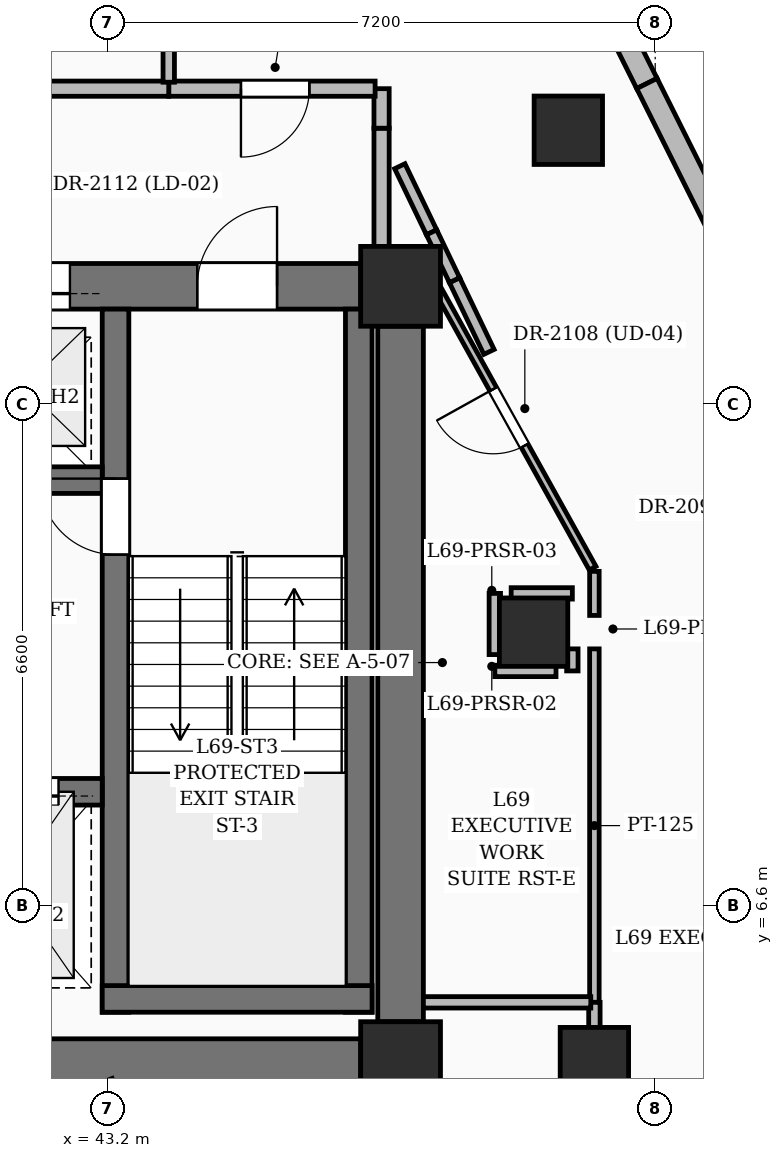
"""IFC4 building model, lengths in metres.
Left out: names, types, materials, properties, quantities, classifications, styles, units other than length and angle.
Written with IfcOpenShell. Run it as: python <this file> out.ifc"""

import sys

from ifc_helpers import new_model, si_unit, direction, frame, frame_2d, origin, origin_2d, place, context, subcontext, project, spatial, rectangle, extrude, element, fill, save


model = new_model("IFC4")
c1 = context("Model", 3, precision=1e-05, world=origin(), true_north=direction((0.0, 1.0)))
c2 = subcontext(c1, "Body", "Model", "MODEL_VIEW")
j1 = project(units=[si_unit("LENGTHUNIT", "METRE"), si_unit("PLANEANGLEUNIT", "RADIAN")], contexts=[c1])
p1 = place(None, origin())
s1 = spatial("IfcSite", under=j1, at=p1, CompositionType="ELEMENT")
p2 = place(p1, origin())
s2 = spatial("IfcBuilding", under=s1, at=p2, CompositionType="ELEMENT")
p3 = place(p2, frame((0.0, 0.0, 267.0)))
s3 = spatial("IfcBuildingStorey", under=s2, at=p3, CompositionType="ELEMENT", Elevation=267.0)
for number, where, z_axis, x_axis in (
    (1, (47.05, 4.55, 0.0), (0.0, 0.0, 1.0), (1.0, 0.0, 0.0)),
    (2, (47.05, 14.75, 0.0), (0.0, 0.0, 1.0), (1.0, 0.0, 0.0)),
):
    element("IfcColumn", number, at=place(p3, frame(where, z_axis=z_axis, x_axis=x_axis)), inside=s3, PredefinedType="COLUMN", context=c2, shape_type="SweptSolid", body=[
        extrude(rectangle(XDim=1.05, YDim=1.05, at=origin_2d()), origin(), (0.0, 0.0, 1.0), 3.75),
    ])
for number, where, z_axis, x_axis in (
    (3, (49.6, 4.55, 0.0), (0.0, 0.0, 1.0), (1.0, 0.0, 0.0)),
    (4, (48.8, 10.2, 0.0), (0.0, 0.0, 1.0), (1.0, 0.0, 0.0)),
):
    element("IfcColumn", number, at=place(p3, frame(where, z_axis=z_axis, x_axis=x_axis)), inside=s3, PredefinedType="COLUMN", context=c2, shape_type="SweptSolid", body=[
        extrude(rectangle(XDim=0.9, YDim=0.9, at=origin_2d()), origin(), (0.0, 0.0, 1.0), 3.75),
    ])
p4 = place(p3, frame((35.675, 4.55, 0.0), z_axis=(0.0, 0.0, 1.0), x_axis=(1.0, 0.0, 0.0)))
e5 = element("IfcWall", 5, at=p4, inside=s3, PredefinedType="SHEAR", context=c2, shape_type="SweptSolid", body=[
    extrude(rectangle(XDim=10.85, YDim=0.6, at=frame_2d((5.425, 0.0))), origin(), (0.0, 0.0, 1.0), 3.75),
])
p5 = place(p3, frame((35.675, 14.75, 0.0), z_axis=(0.0, 0.0, 1.0), x_axis=(1.0, 0.0, 0.0)))
e6 = element("IfcWall", 6, at=p5, inside=s3, PredefinedType="SHEAR", context=c2, shape_type="SweptSolid", body=[
    extrude(rectangle(XDim=10.85, YDim=0.6, at=frame_2d((5.425, 0.0))), origin(), (0.0, 0.0, 1.0), 3.75),
])
p6 = place(p5, frame((1.1, 0.0, 0.0)))
e7 = element("IfcOpeningElement", 7, at=p6, cuts=e6, PredefinedType="OPENING", context=c2, shape_type="SweptSolid", body=[
    extrude(rectangle(XDim=1.05, YDim=2.15, at=frame_2d((0.525, 1.075))), frame((0.0, 0.31, 0.0), z_axis=(0.0, -1.0, 0.0), x_axis=(1.0, 0.0, 0.0)), (0.0, 0.0, 1.0), 0.62),
])
p7 = place(p5, frame((8.7, 0.0, 0.0)))
e8 = element("IfcOpeningElement", 8, at=p7, cuts=e6, PredefinedType="OPENING", context=c2, shape_type="SweptSolid", body=[
    extrude(rectangle(XDim=1.05, YDim=2.15, at=frame_2d((0.525, 1.075))), frame((0.0, 0.31, 0.0), z_axis=(0.0, -1.0, 0.0), x_axis=(1.0, 0.0, 0.0)), (0.0, 0.0, 1.0), 0.62),
])
p8 = place(p5, frame((3.825, 0.0, 0.0)))
e9 = element("IfcOpeningElement", 9, at=p8, cuts=e6, PredefinedType="OPENING", context=c2, shape_type="SweptSolid", body=[
    extrude(rectangle(XDim=1.2, YDim=2.2, at=frame_2d((0.6, 1.1))), frame((0.0, 0.31, 0.0), z_axis=(0.0, -1.0, 0.0), x_axis=(1.0, 0.0, 0.0)), (0.0, 0.0, 1.0), 0.62),
])
p9 = place(p5, frame((5.825, 0.0, 0.0)))
e10 = element("IfcOpeningElement", 10, at=p9, cuts=e6, PredefinedType="OPENING", context=c2, shape_type="SweptSolid", body=[
    extrude(rectangle(XDim=1.2, YDim=2.2, at=frame_2d((0.6, 1.1))), frame((0.0, 0.31, 0.0), z_axis=(0.0, -1.0, 0.0), x_axis=(1.0, 0.0, 0.0)), (0.0, 0.0, 1.0), 0.62),
])
p10 = place(p3, frame((47.05, 5.075, 0.0), z_axis=(0.0, 0.0, 1.0), x_axis=(0.0, 1.0, 0.0)))
e11 = element("IfcWall", 11, at=p10, inside=s3, PredefinedType="SHEAR", context=c2, shape_type="SweptSolid", body=[
    extrude(rectangle(XDim=9.15, YDim=0.6, at=frame_2d((4.575, 0.0))), origin(), (0.0, 0.0, 1.0), 3.75),
])
p11 = place(p3, frame((43.3, 5.2, 0.0), z_axis=(0.0, 0.0, 1.0), x_axis=(0.0, 1.0, 0.0)))
e12 = element("IfcWall", 12, at=p11, inside=s3, PredefinedType="SOLIDWALL", context=c2, shape_type="SweptSolid", body=[
    extrude(rectangle(XDim=9.25, YDim=0.35, at=frame_2d((4.625, 0.0))), origin(), (0.0, 0.0, 1.0), 3.75),
])
p12 = place(p11, frame((6.02, 0.0, 0.0)))
e13 = element("IfcOpeningElement", 13, at=p12, cuts=e12, PredefinedType="OPENING", context=c2, shape_type="SweptSolid", body=[
    extrude(rectangle(XDim=1.0, YDim=2.15, at=frame_2d((0.5, 1.075))), frame((0.0, 0.185, 0.0), z_axis=(0.0, -1.0, 0.0), x_axis=(1.0, 0.0, 0.0)), (0.0, 0.0, 1.0), 0.37),
])
p13 = place(p3, frame((46.5, 5.2, 0.0), z_axis=(0.0, 0.0, 1.0), x_axis=(0.0, 1.0, 0.0)))
e14 = element("IfcWall", 14, at=p13, inside=s3, PredefinedType="SOLIDWALL", context=c2, shape_type="SweptSolid", body=[
    extrude(rectangle(XDim=9.25, YDim=0.35, at=frame_2d((4.625, 0.0))), origin(), (0.0, 0.0, 1.0), 3.75),
])
p14 = place(p3, frame((43.125, 5.375, 0.0), z_axis=(0.0, 0.0, 1.0), x_axis=(1.0, 0.0, 0.0)))
e15 = element("IfcWall", 15, at=p14, inside=s3, PredefinedType="SOLIDWALL", context=c2, shape_type="SweptSolid", body=[
    extrude(rectangle(XDim=3.55, YDim=0.35, at=frame_2d((1.775, 0.0))), origin(), (0.0, 0.0, 1.0), 3.75),
])
p15 = place(p3, frame((40.55, 8.1, 0.0), z_axis=(0.0, 0.0, 1.0), x_axis=(1.0, 0.0, 0.0)))
e16 = element("IfcWall", 16, at=p15, inside=s3, PredefinedType="SOLIDWALL", context=c2, shape_type="SweptSolid", body=[
    extrude(rectangle(XDim=2.575, YDim=0.35, at=frame_2d((1.288, 0.0))), origin(), (0.0, 0.0, 1.0), 3.75),
])
p16 = place(p15, frame((0.7, 0.0, 0.0)))
e17 = element("IfcOpeningElement", 17, at=p16, cuts=e16, PredefinedType="OPENING", context=c2, shape_type="SweptSolid", body=[
    extrude(rectangle(XDim=1.3, YDim=2.25, at=frame_2d((0.65, 1.125))), frame((0.0, 0.185, 0.0), z_axis=(0.0, -1.0, 0.0), x_axis=(1.0, 0.0, 0.0)), (0.0, 0.0, 1.0), 0.37),
])
p17 = place(p3, frame((39.075, 12.2, 0.0), z_axis=(0.0, 0.0, 1.0), x_axis=(1.0, 0.0, 0.0)))
e18 = element("IfcWall", 18, at=p17, inside=s3, PredefinedType="SOLIDWALL", context=c2, shape_type="SweptSolid", body=[
    extrude(rectangle(XDim=4.05, YDim=0.35, at=frame_2d((2.025, 0.0))), origin(), (0.0, 0.0, 1.0), 3.75),
])
p18 = place(p3, frame((49.257, 16.803, 0.0), z_axis=(0.0, 0.0, 1.0), x_axis=(1.0, 0.0, 0.0)))
e19 = element("IfcColumn", 19, at=p18, inside=s3, PredefinedType="COLUMN", context=c2, shape_type="SweptSolid", body=[
    extrude(rectangle(XDim=0.9, YDim=0.9, at=origin_2d()), origin(), (0.0, 0.0, 1.0), 3.75),
])
p19 = place(p3, frame((47.372, 23.255, 0.0), z_axis=(0.0, 0.0, 1.0), x_axis=(0.447228560422, -0.894419708382, 0.0)))
e20 = element("IfcWall", 20, at=p19, inside=s3, PredefinedType="SOLIDWALL", context=c2, shape_type="SweptSolid", body=[
    extrude(rectangle(XDim=6.526, YDim=0.3, at=frame_2d((3.263, 0.0))), origin(), (0.0, 0.0, 1.0), 3.5),
])
p20 = place(p19, frame((3.0, 0.0, 0.6)))
e21 = element("IfcOpeningElement", 21, at=p20, cuts=e20, PredefinedType="OPENING", context=c2, shape_type="SweptSolid", body=[
    extrude(rectangle(XDim=1.5, YDim=2.1, at=frame_2d((0.75, 1.05))), frame((0.0, 0.16, 0.0), z_axis=(0.0, -1.0, 0.0), x_axis=(1.0, 0.0, 0.0)), (0.0, 0.0, 1.0), 0.32),
])
p21 = place(p3, frame((50.291, 17.418, 0.0), z_axis=(0.0, 0.0, 1.0), x_axis=(0.447227954985, -0.894420011113, 0.0)))
e22 = element("IfcWall", 22, at=p21, inside=s3, PredefinedType="SOLIDWALL", context=c2, shape_type="SweptSolid", body=[
    extrude(rectangle(XDim=6.801, YDim=0.3, at=frame_2d((3.4, 0.0))), origin(), (0.0, 0.0, 1.0), 3.5),
])
p22 = place(p21, frame((4.509, 0.0, 0.0)))
e23 = element("IfcOpeningElement", 23, at=p22, cuts=e22, PredefinedType="OPENING", context=c2, shape_type="SweptSolid", body=[
    extrude(rectangle(XDim=1.0, YDim=2.2, at=frame_2d((0.5, 1.1))), frame((0.0, 0.16, 0.0), z_axis=(0.0, -1.0, 0.0), x_axis=(1.0, 0.0, 0.0)), (0.0, 0.0, 1.0), 0.32),
])
p23 = place(p3, frame((46.8, 15.05, 0.0), z_axis=(0.0, 0.0, 1.0), x_axis=(0.0, 1.0, 0.0)))
e24 = element("IfcWall", 24, at=p23, inside=s3, PredefinedType="PARTITIONING", context=c2, shape_type="SweptSolid", body=[
    extrude(rectangle(XDim=1.78, YDim=0.2, at=frame_2d((0.89, 0.0))), origin(), (0.0, 0.0, 1.0), 2.685),
])
p24 = place(p3, frame((46.8, 16.83, 0.0), z_axis=(0.0, 0.0, 1.0), x_axis=(0.0, 1.0, 0.0)))
e25 = element("IfcWall", 25, at=p24, inside=s3, PredefinedType="PARTITIONING", context=c2, shape_type="SweptSolid", body=[
    extrude(rectangle(XDim=0.52, YDim=0.2, at=frame_2d((0.26, 0.0))), origin(), (0.0, 0.0, 1.0), 3.5),
])
p25 = place(p3, frame((46.715, 17.35, 0.0), z_axis=(0.0, 0.0, 1.0), x_axis=(-1.0, 0.0, 0.0)))
e26 = element("IfcWall", 26, at=p25, inside=s3, PredefinedType="PARTITIONING", context=c2, shape_type="SweptSolid", body=[
    extrude(rectangle(XDim=2.715, YDim=0.2, at=frame_2d((1.357, 0.0))), origin(), (0.0, 0.0, 1.0), 2.685),
])
p26 = place(p25, frame((0.865, 0.0, 0.0)))
e27 = element("IfcOpeningElement", 27, at=p26, cuts=e26, PredefinedType="OPENING", context=c2, shape_type="SweptSolid", body=[
    extrude(rectangle(XDim=0.9, YDim=2.1, at=frame_2d((0.45, 1.05))), frame((0.0, 0.11, 0.0), z_axis=(0.0, -1.0, 0.0), x_axis=(1.0, 0.0, 0.0)), (0.0, 0.0, 1.0), 0.22),
])
p27 = place(p3, frame((44.0, 17.35, 0.0), z_axis=(0.0, 0.0, 1.0), x_axis=(-1.0, 0.0, 0.0)))
e28 = element("IfcWall", 28, at=p27, inside=s3, PredefinedType="PARTITIONING", context=c2, shape_type="SweptSolid", body=[
    extrude(rectangle(XDim=5.8, YDim=0.2, at=frame_2d((2.9, 0.0))), origin(), (0.0, 0.0, 1.0), 3.5),
])
p28 = place(p27, frame((2.391, 0.0, 0.0)))
e29 = element("IfcOpeningElement", 29, at=p28, cuts=e28, PredefinedType="OPENING", context=c2, shape_type="SweptSolid", body=[
    extrude(rectangle(XDim=0.9, YDim=2.1, at=frame_2d((0.45, 1.05))), frame((0.0, 0.11, 0.0), z_axis=(0.0, -1.0, 0.0), x_axis=(1.0, 0.0, 0.0)), (0.0, 0.0, 1.0), 0.22),
])
p29 = place(p3, frame((49.6, 9.98, 0.0), z_axis=(0.0, 0.0, 1.0), x_axis=(0.0, -1.0, 0.0)))
e30 = element("IfcWall", 30, at=p29, inside=s3, PredefinedType="PARTITIONING", context=c2, shape_type="SweptSolid", body=[
    extrude(rectangle(XDim=4.65, YDim=0.125, at=frame_2d((2.325, 0.0))), origin(), (0.0, 0.0, 1.0), 1.27),
])
p30 = place(p3, frame((49.6, 11.0, 0.0), z_axis=(0.0, 0.0, 1.0), x_axis=(0.0, -1.0, 0.0)))
e31 = element("IfcWall", 31, at=p30, inside=s3, PredefinedType="PARTITIONING", context=c2, shape_type="SweptSolid", body=[
    extrude(rectangle(XDim=0.58, YDim=0.125, at=frame_2d((0.29, 0.0))), origin(), (0.0, 0.0, 1.0), 1.27),
])
p31 = place(p3, frame((49.6, 5.33, 0.0), z_axis=(0.0, 0.0, 1.0), x_axis=(0.0, -1.0, 0.0)))
e32 = element("IfcWall", 32, at=p31, inside=s3, PredefinedType="PARTITIONING", context=c2, shape_type="SweptSolid", body=[
    extrude(rectangle(XDim=2.11, YDim=0.15, at=frame_2d((1.055, 0.0))), origin(), (0.0, 0.0, 1.0), 2.82),
])
p32 = place(p3, frame((47.35, 5.33, 0.0), z_axis=(0.0, 0.0, 1.0), x_axis=(1.0, 0.0, 0.0)))
e33 = element("IfcWall", 33, at=p32, inside=s3, PredefinedType="PARTITIONING", context=c2, shape_type="SweptSolid", body=[
    extrude(rectangle(XDim=2.202, YDim=0.15, at=frame_2d((1.101, 0.0))), origin(), (0.0, 0.0, 1.0), 2.685),
])
p33 = place(p3, frame((44.0, 21.37, 0.0), z_axis=(0.0, 0.0, 1.0), x_axis=(0.0, -1.0, 0.0)))
e34 = element("IfcWall", 34, at=p33, inside=s3, PredefinedType="PARTITIONING", context=c2, shape_type="SweptSolid", body=[
    extrude(rectangle(XDim=3.935, YDim=0.15, at=frame_2d((1.968, 0.0))), origin(), (0.0, 0.0, 1.0), 3.003),
])
p34 = place(p3, frame((49.577, 11.042, 0.0), z_axis=(0.0, 0.0, 1.0), x_axis=(-0.485615807912, 0.874172344052, 0.0)))
e35 = element("IfcWall", 35, at=p34, inside=s3, PredefinedType="PARTITIONING", context=c2, shape_type="SweptSolid", body=[
    extrude(rectangle(XDim=4.585, YDim=0.1, at=frame_2d((2.293, 0.0))), origin(), (0.0, 0.0, 1.0), 3.5),
])
p35 = place(p34, frame((1.844, 0.0, 0.0)))
e36 = element("IfcOpeningElement", 36, at=p35, cuts=e35, PredefinedType="OPENING", context=c2, shape_type="SweptSolid", body=[
    extrude(rectangle(XDim=0.85, YDim=2.1, at=frame_2d((0.425, 1.05))), frame((0.0, 0.06, 0.0), z_axis=(0.0, -1.0, 0.0), x_axis=(1.0, 0.0, 0.0)), (0.0, 0.0, 1.0), 0.12),
])
p36 = place(p3, frame((49.31, 9.98, 0.0), z_axis=(0.0, 0.0, 1.0), x_axis=(0.0, -1.0, 0.0)))
e37 = element("IfcWall", 37, at=p36, inside=s3, PredefinedType="PARTITIONING", context=c2, shape_type="SweptSolid", body=[
    extrude(rectangle(XDim=0.29, YDim=0.15, at=frame_2d((0.145, 0.0))), origin(), (0.0, 0.0, 1.0), 1.27),
])
p37 = place(p3, frame((49.095, 9.69, 0.0), z_axis=(0.0, 0.0, 1.0), x_axis=(-1.0, 0.0, 0.0)))
e38 = element("IfcWall", 38, at=p37, inside=s3, PredefinedType="PARTITIONING", context=c2, shape_type="SweptSolid", body=[
    extrude(rectangle(XDim=0.805, YDim=0.15, at=frame_2d((0.402, 0.0))), origin(), (0.0, 0.0, 1.0), 2.685),
])
p38 = place(p3, frame((48.29, 9.905, 0.0), z_axis=(0.0, 0.0, 1.0), x_axis=(0.0, 1.0, 0.0)))
e39 = element("IfcWall", 39, at=p38, inside=s3, PredefinedType="PARTITIONING", context=c2, shape_type="SweptSolid", body=[
    extrude(rectangle(XDim=0.805, YDim=0.15, at=frame_2d((0.402, 0.0))), origin(), (0.0, 0.0, 1.0), 3.5),
])
p39 = place(p3, frame((48.505, 10.71, 0.0), z_axis=(0.0, 0.0, 1.0), x_axis=(1.0, 0.0, 0.0)))
e40 = element("IfcWall", 40, at=p39, inside=s3, PredefinedType="PARTITIONING", context=c2, shape_type="SweptSolid", body=[
    extrude(rectangle(XDim=0.805, YDim=0.15, at=frame_2d((0.403, 0.0))), origin(), (0.0, 0.0, 1.0), 3.5),
])
p40 = place(p3, frame((48.213, 13.887, 0.0), z_axis=(0.0, 0.0, 1.0), x_axis=(-0.432511235762, 0.901628543769, 0.0)))
e41 = element("IfcWall", 41, at=p40, inside=s3, PredefinedType="PARTITIONING", context=c2, shape_type="SweptSolid", body=[
    extrude(rectangle(XDim=1.047, YDim=0.15, at=frame_2d((0.523, 0.0))), origin(), (0.0, 0.0, 1.0), 3.5),
])
p41 = place(p3, frame((47.458, 15.46, 0.0), z_axis=(0.0, 0.0, 1.0), x_axis=(-0.432994161926, 0.901396724943, 0.0)))
e42 = element("IfcWall", 42, at=p41, inside=s3, PredefinedType="PARTITIONING", context=c2, shape_type="SweptSolid", body=[
    extrude(rectangle(XDim=0.965, YDim=0.15, at=frame_2d((0.483, 0.0))), origin(), (0.0, 0.0, 1.0), 3.5),
])
p42 = place(p3, frame((47.76, 14.831, 0.0), z_axis=(0.0, 0.0, 1.0), x_axis=(-0.432878956865, 0.901452055687, 0.0)))
e43 = element("IfcWall", 43, at=p42, inside=s3, PredefinedType="PARTITIONING", context=c2, shape_type="SweptSolid", body=[
    extrude(rectangle(XDim=0.698, YDim=0.15, at=frame_2d((0.349, 0.0))), origin(), (0.0, 0.0, 1.0), 3.5),
])
p43 = place(p7, origin())
e44 = element("IfcDoor", 44, at=p43, inside=s3, OperationType="SINGLE_SWING_RIGHT", PredefinedType="DOOR", context=c2, shape_type="SweptSolid", body=[
    extrude(rectangle(XDim=1.05, YDim=2.15, at=frame_2d((0.525, 1.075))), frame((0.0, 0.025, 0.0), z_axis=(0.0, -1.0, 0.0), x_axis=(1.0, 0.0, 0.0)), (0.0, 0.0, 1.0), 0.05),
])
fill(e8, e44)
p44 = place(p12, origin())
e45 = element("IfcDoor", 45, at=p44, inside=s3, OperationType="SINGLE_SWING_RIGHT", PredefinedType="DOOR", context=c2, shape_type="SweptSolid", body=[
    extrude(rectangle(XDim=1.0, YDim=2.15, at=frame_2d((0.5, 1.075))), frame((0.0, 0.025, 0.0), z_axis=(0.0, -1.0, 0.0), x_axis=(1.0, 0.0, 0.0)), (0.0, 0.0, 1.0), 0.05),
])
fill(e13, e45)
p45 = place(p16, origin())
e46 = element("IfcDoor", 46, at=p45, inside=s3, OperationType="DOUBLE_DOOR_SLIDING", PredefinedType="DOOR", context=c2, shape_type="SweptSolid", body=[
    extrude(rectangle(XDim=1.3, YDim=2.25, at=frame_2d((0.65, 1.125))), frame((0.0, 0.025, 0.0), z_axis=(0.0, -1.0, 0.0), x_axis=(1.0, 0.0, 0.0)), (0.0, 0.0, 1.0), 0.05),
])
fill(e17, e46)
p46 = place(p9, origin())
e47 = element("IfcDoor", 47, at=p46, inside=s3, OperationType="DOUBLE_DOOR_SLIDING", PredefinedType="DOOR", context=c2, shape_type="SweptSolid", body=[
    extrude(rectangle(XDim=1.2, YDim=2.2, at=frame_2d((0.6, 1.1))), frame((0.0, 0.025, 0.0), z_axis=(0.0, -1.0, 0.0), x_axis=(1.0, 0.0, 0.0)), (0.0, 0.0, 1.0), 0.05),
])
fill(e10, e47)
p47 = place(p26, origin())
e48 = element("IfcDoor", 48, at=p47, inside=s3, OperationType="SINGLE_SWING_RIGHT", PredefinedType="DOOR", context=c2, shape_type="SweptSolid", body=[
    extrude(rectangle(XDim=0.9, YDim=2.1, at=frame_2d((0.45, 1.05))), frame((0.0, 0.025, 0.0), z_axis=(0.0, -1.0, 0.0), x_axis=(1.0, 0.0, 0.0)), (0.0, 0.0, 1.0), 0.05),
])
fill(e27, e48)
p48 = place(p35, origin())
e49 = element("IfcDoor", 49, at=p48, inside=s3, OperationType="SINGLE_SWING_RIGHT", PredefinedType="DOOR", context=c2, shape_type="SweptSolid", body=[
    extrude(rectangle(XDim=0.85, YDim=2.1, at=frame_2d((0.425, 1.05))), frame((0.0, 0.025, 0.0), z_axis=(0.0, -1.0, 0.0), x_axis=(1.0, 0.0, 0.0)), (0.0, 0.0, 1.0), 0.05),
])
fill(e36, e49)
save(model, sys.argv[1])
